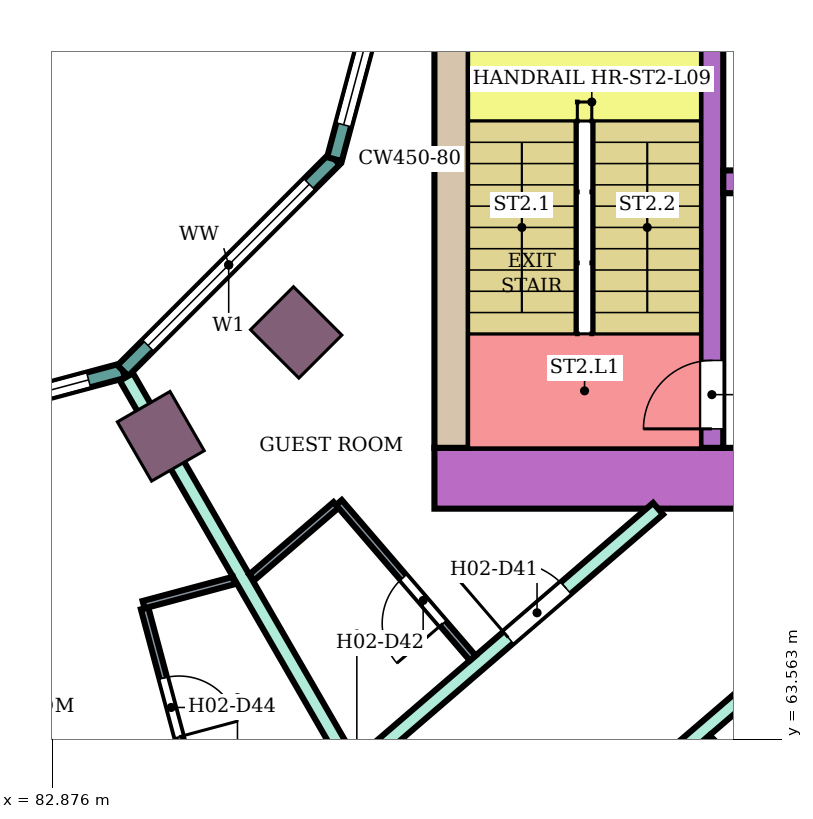
"""IFC4 building model, lengths in metres.
Left out: names, types, materials, properties, quantities, classifications, styles, units other than length and angle.
Written with IfcOpenShell. Run it as: python <this file> out.ifc"""

import sys

from ifc_helpers import new_model, si_unit, direction, frame, frame_2d, origin, origin_2d, place, context, subcontext, project, spatial, rectangle, extrude, element, fill, save


model = new_model("IFC4")
c1 = context("Model", 3, precision=1e-05, world=origin(), true_north=direction((0.0, 1.0)))
c2 = subcontext(c1, "Body", "Model", "MODEL_VIEW")
j1 = project(units=[si_unit("LENGTHUNIT", "METRE"), si_unit("PLANEANGLEUNIT", "RADIAN")], contexts=[c1])
p1 = place(None, origin())
s1 = spatial("IfcSite", under=j1, at=p1, CompositionType="ELEMENT")
p2 = place(p1, origin())
s2 = spatial("IfcBuilding", under=s1, at=p2, CompositionType="ELEMENT")
p3 = place(p2, frame((0.0, 0.0, 44.0)))
s3 = spatial("IfcBuildingStorey", under=s2, at=p3, CompositionType="ELEMENT", Elevation=44.0)
for number, where, z_axis, x_axis in (
    (1, (84.3, 67.552, 0.0), (0.0, 0.0, 1.0), (0.5, -0.866, 0.0)),
    (2, (86.081, 68.919, 0.0), (0.0, 0.0, 1.0), (0.707, -0.707, 0.0)),
):
    element("IfcColumn", number, at=place(p3, frame(where, z_axis=z_axis, x_axis=x_axis)), inside=s3, PredefinedType="COLUMN", context=c2, shape_type="SweptSolid", body=[
        extrude(rectangle(XDim=0.9, YDim=0.8, at=origin_2d()), origin(), (0.0, 0.0, 1.0), 3.8),
    ])
p4 = place(p3, frame((87.9, 67.0, 0.0), z_axis=(0.0, 0.0, 1.0), x_axis=(1.0, 0.0, 0.0)))
e3 = element("IfcWall", 3, at=p4, inside=s3, PredefinedType="SHEAR", context=c2, shape_type="SweptSolid", body=[
    extrude(rectangle(XDim=14.7, YDim=0.8, at=frame_2d((7.35, 0.0))), origin(), (0.0, 0.0, 1.0), 3.48),
])
p5 = place(p4, frame((4.2, 0.0, 0.0)))
e4 = element("IfcOpeningElement", 4, at=p5, cuts=e3, PredefinedType="OPENING", context=c2, shape_type="SweptSolid", body=[
    extrude(rectangle(XDim=2.4, YDim=2.4, at=frame_2d((1.2, 1.2))), frame((0.0, 0.41, 0.0), z_axis=(0.0, -1.0, 0.0), x_axis=(1.0, 0.0, 0.0)), (0.0, 0.0, 1.0), 0.82),
])
p6 = place(p3, frame((88.125, 67.4, 0.0), z_axis=(0.0, 0.0, 1.0), x_axis=(0.0, 1.0, 0.0)))
e5 = element("IfcWall", 5, at=p6, inside=s3, PredefinedType="SHEAR", context=c2, shape_type="SweptSolid", body=[
    extrude(rectangle(XDim=7.6, YDim=0.45, at=frame_2d((3.8, 0.0))), origin(), (0.0, 0.0, 1.0), 3.48),
])
p7 = place(p3, frame((91.55, 67.4, 0.0), z_axis=(0.0, 0.0, 1.0), x_axis=(0.0, 1.0, 0.0)))
e6 = element("IfcWall", 6, at=p7, inside=s3, PredefinedType="SHEAR", context=c2, shape_type="SweptSolid", body=[
    extrude(rectangle(XDim=7.6, YDim=0.3, at=frame_2d((3.8, 0.0))), origin(), (0.0, 0.0, 1.0), 3.48),
])
p8 = place(p7, frame((0.25, 0.0, 0.0)))
e7 = element("IfcOpeningElement", 7, at=p8, cuts=e6, PredefinedType="OPENING", context=c2, shape_type="SweptSolid", body=[
    extrude(rectangle(XDim=0.9, YDim=2.1, at=frame_2d((0.45, 1.05))), frame((0.0, 0.16, 0.0), z_axis=(0.0, -1.0, 0.0), x_axis=(1.0, 0.0, 0.0)), (0.0, 0.0, 1.0), 0.32),
])
p9 = place(p3, frame((91.7, 70.9, 0.0), z_axis=(0.0, 0.0, 1.0), x_axis=(1.0, 0.0, 0.0)))
e8 = element("IfcWall", 8, at=p9, inside=s3, PredefinedType="SHEAR", context=c2, shape_type="SweptSolid", body=[
    extrude(rectangle(XDim=10.9, YDim=0.3, at=frame_2d((5.45, 0.0))), origin(), (0.0, 0.0, 1.0), 3.48),
])
p10 = place(p9, frame((0.4, 0.0, 0.0)))
e9 = element("IfcOpeningElement", 9, at=p10, cuts=e8, PredefinedType="OPENING", context=c2, shape_type="SweptSolid", body=[
    extrude(rectangle(XDim=1.4, YDim=2.1, at=frame_2d((0.7, 1.05))), frame((0.0, 0.16, 0.0), z_axis=(0.0, -1.0, 0.0), x_axis=(1.0, 0.0, 0.0)), (0.0, 0.0, 1.0), 0.32),
])
p11 = place(p9, frame((5.4, 0.0, 0.0)))
e10 = element("IfcOpeningElement", 10, at=p11, cuts=e8, PredefinedType="OPENING", context=c2, shape_type="SweptSolid", body=[
    extrude(rectangle(XDim=1.4, YDim=2.1, at=frame_2d((0.7, 1.05))), frame((0.0, 0.16, 0.0), z_axis=(0.0, -1.0, 0.0), x_axis=(1.0, 0.0, 0.0)), (0.0, 0.0, 1.0), 0.32),
])
p12 = place(p9, frame((8.1, 0.0, 0.0)))
e11 = element("IfcOpeningElement", 11, at=p12, cuts=e8, PredefinedType="OPENING", context=c2, shape_type="SweptSolid", body=[
    extrude(rectangle(XDim=1.0, YDim=2.1, at=frame_2d((0.5, 1.05))), frame((0.0, 0.16, 0.0), z_axis=(0.0, -1.0, 0.0), x_axis=(1.0, 0.0, 0.0)), (0.0, 0.0, 1.0), 0.32),
])
p13 = place(p3, frame((80.0, 67.396, 0.0), z_axis=(0.0, 0.0, 1.0), x_axis=(0.965933654434, 0.258789828301, 0.0)))
e12 = element("IfcWall", 12, at=p13, inside=s3, PredefinedType="NOTDEFINED", context=c2, shape_type="SweptSolid", body=[
    extrude(rectangle(XDim=3.936, YDim=0.2, at=frame_2d((1.968, 0.0))), origin(), (0.0, 0.0, 1.0), 3.8),
])
p14 = place(p13, frame((0.468, 0.0, 0.9)))
e13 = element("IfcOpeningElement", 13, at=p14, cuts=e12, PredefinedType="OPENING", context=c2, shape_type="SweptSolid", body=[
    extrude(rectangle(XDim=3.0, YDim=2.3, at=frame_2d((1.5, 1.15))), frame((0.0, 0.11, 0.0), z_axis=(0.0, -1.0, 0.0), x_axis=(1.0, 0.0, 0.0)), (0.0, 0.0, 1.0), 0.22),
])
p15 = place(p3, frame((83.802, 68.415, 0.0), z_axis=(0.0, 0.0, 1.0), x_axis=(0.707106781187, 0.707106781187, 0.0)))
e14 = element("IfcWall", 14, at=p15, inside=s3, PredefinedType="NOTDEFINED", context=c2, shape_type="SweptSolid", body=[
    extrude(rectangle(XDim=3.936, YDim=0.2, at=frame_2d((1.968, 0.0))), origin(), (0.0, 0.0, 1.0), 3.8),
])
p16 = place(p15, frame((0.468, 0.0, 0.9)))
e15 = element("IfcOpeningElement", 15, at=p16, cuts=e14, PredefinedType="OPENING", context=c2, shape_type="SweptSolid", body=[
    extrude(rectangle(XDim=3.0, YDim=2.3, at=frame_2d((1.5, 1.15))), frame((0.0, 0.11, 0.0), z_axis=(0.0, -1.0, 0.0), x_axis=(1.0, 0.0, 0.0)), (0.0, 0.0, 1.0), 0.22),
])
p17 = place(p3, frame((86.585, 71.198, 0.0), z_axis=(0.0, 0.0, 1.0), x_axis=(0.258789828301, 0.965933654434, 0.0)))
e16 = element("IfcWall", 16, at=p17, inside=s3, PredefinedType="NOTDEFINED", context=c2, shape_type="SweptSolid", body=[
    extrude(rectangle(XDim=3.936, YDim=0.2, at=frame_2d((1.968, 0.0))), origin(), (0.0, 0.0, 1.0), 3.8),
])
p18 = place(p17, frame((0.468, 0.0, 0.9)))
e17 = element("IfcOpeningElement", 17, at=p18, cuts=e16, PredefinedType="OPENING", context=c2, shape_type="SweptSolid", body=[
    extrude(rectangle(XDim=3.0, YDim=2.3, at=frame_2d((1.5, 1.15))), frame((0.0, 0.11, 0.0), z_axis=(0.0, -1.0, 0.0), x_axis=(1.0, 0.0, 0.0)), (0.0, 0.0, 1.0), 0.22),
])
p19 = place(p3, frame((83.848, 68.332, 0.0), z_axis=(0.0, 0.0, 1.0), x_axis=(0.499919778085, -0.866071714975, 0.0)))
e18 = element("IfcWall", 18, at=p19, inside=s3, PredefinedType="PARTITIONING", context=c2, shape_type="SweptSolid", body=[
    extrude(rectangle(XDim=5.855, YDim=0.2, at=frame_2d((2.927, 0.0))), origin(), (0.0, 0.0, 1.0), 3.35),
])
p20 = place(p3, frame((86.877, 63.189, 0.0), z_axis=(0.0, 0.0, 1.0), x_axis=(0.758164888471, 0.652062881853, 0.0)))
e19 = element("IfcWall", 19, at=p20, inside=s3, PredefinedType="PARTITIONING", context=c2, shape_type="SweptSolid", body=[
    extrude(rectangle(XDim=5.23, YDim=0.2, at=frame_2d((2.615, 0.0))), origin(), (0.0, 0.0, 1.0), 3.35),
])
p21 = place(p20, frame((2.63, 0.0, 0.0)))
e20 = element("IfcOpeningElement", 20, at=p21, cuts=e19, PredefinedType="OPENING", context=c2, shape_type="SweptSolid", body=[
    extrude(rectangle(XDim=1.0, YDim=2.1, at=frame_2d((0.5, 1.05))), frame((0.0, 0.11, 0.0), z_axis=(0.0, -1.0, 0.0), x_axis=(1.0, 0.0, 0.0)), (0.0, 0.0, 1.0), 0.22),
])
p22 = place(p3, frame((88.235, 60.931, 0.0), z_axis=(0.0, 0.0, 1.0), x_axis=(0.758799498714, 0.651324282329, 0.0)))
e21 = element("IfcWall", 21, at=p22, inside=s3, PredefinedType="PARTITIONING", context=c2, shape_type="SweptSolid", body=[
    extrude(rectangle(XDim=6.186, YDim=0.2, at=frame_2d((3.093, 0.0))), origin(), (0.0, 0.0, 1.0), 3.35),
])
p23 = place(p22, frame((1.519, 0.0, 0.0)))
e22 = element("IfcOpeningElement", 22, at=p23, cuts=e21, PredefinedType="OPENING", context=c2, shape_type="SweptSolid", body=[
    extrude(rectangle(XDim=1.0, YDim=2.1, at=frame_2d((0.5, 1.05))), frame((0.0, 0.11, 0.0), z_axis=(0.0, -1.0, 0.0), x_axis=(1.0, 0.0, 0.0)), (0.0, 0.0, 1.0), 0.22),
])
p24 = place(p3, frame((91.449, 63.548, 0.0), z_axis=(0.0, 0.0, 1.0), x_axis=(0.706984810649, -0.707228730688, 0.0)))
e23 = element("IfcWall", 23, at=p24, inside=s3, PredefinedType="PARTITIONING", context=c2, shape_type="SweptSolid", body=[
    extrude(rectangle(XDim=7.006, YDim=0.2, at=frame_2d((3.503, 0.0))), origin(), (0.0, 0.0, 1.0), 3.35),
])
p25 = place(p3, frame((84.087, 65.289, 0.0), z_axis=(0.0, 0.0, 1.0), x_axis=(0.258929459649, -0.965896234037, 0.0)))
e24 = element("IfcWall", 24, at=p25, inside=s3, PredefinedType="PARTITIONING", context=c2, shape_type="SweptSolid", body=[
    extrude(rectangle(XDim=2.65, YDim=0.1, at=frame_2d((1.325, 0.0))), origin(), (0.0, 0.0, 1.0), 3.35),
])
p26 = place(p25, frame((0.95, 0.0, 0.0)))
e25 = element("IfcOpeningElement", 25, at=p26, cuts=e24, PredefinedType="OPENING", context=c2, shape_type="SweptSolid", body=[
    extrude(rectangle(XDim=0.8, YDim=2.1, at=frame_2d((0.4, 1.05))), frame((0.0, 0.06, 0.0), z_axis=(0.0, -1.0, 0.0), x_axis=(1.0, 0.0, 0.0)), (0.0, 0.0, 1.0), 0.12),
])
p27 = place(p3, frame((84.074, 65.337, 0.0), z_axis=(0.0, 0.0, 1.0), x_axis=(0.965914351064, 0.258861867428, 0.0)))
e26 = element("IfcWall", 26, at=p27, inside=s3, PredefinedType="PARTITIONING", context=c2, shape_type="SweptSolid", body=[
    extrude(rectangle(XDim=1.229, YDim=0.1, at=frame_2d((0.615, 0.0))), origin(), (0.0, 0.0, 1.0), 3.35),
])
p28 = place(p3, frame((85.497, 65.696, 0.0), z_axis=(0.0, 0.0, 1.0), x_axis=(0.75817032582, 0.652056559698, 0.0)))
e27 = element("IfcWall", 27, at=p28, inside=s3, PredefinedType="PARTITIONING", context=c2, shape_type="SweptSolid", body=[
    extrude(rectangle(XDim=1.461, YDim=0.1, at=frame_2d((0.73, 0.0))), origin(), (0.0, 0.0, 1.0), 3.35),
])
p29 = place(p3, frame((86.643, 66.681, 0.0), z_axis=(0.0, 0.0, 1.0), x_axis=(0.652264876065, -0.757991115682, 0.0)))
e28 = element("IfcWall", 28, at=p29, inside=s3, PredefinedType="PARTITIONING", context=c2, shape_type="SweptSolid", body=[
    extrude(rectangle(XDim=2.699, YDim=0.1, at=frame_2d((1.35, 0.0))), origin(), (0.0, 0.0, 1.0), 3.35),
])
p30 = place(p29, frame((1.3, 0.0, 0.0)))
e29 = element("IfcOpeningElement", 29, at=p30, cuts=e28, PredefinedType="OPENING", context=c2, shape_type="SweptSolid", body=[
    extrude(rectangle(XDim=0.8, YDim=2.1, at=frame_2d((0.4, 1.05))), frame((0.0, 0.06, 0.0), z_axis=(0.0, -1.0, 0.0), x_axis=(1.0, 0.0, 0.0)), (0.0, 0.0, 1.0), 0.12),
])
p31 = place(p14, origin())
e30 = element("IfcWindow", 30, at=p31, inside=s3, PartitioningType="SINGLE_PANEL", PredefinedType="WINDOW", context=c2, shape_type="SweptSolid", body=[
    extrude(rectangle(XDim=3.0, YDim=2.3, at=frame_2d((1.5, 1.15))), frame((0.0, 0.03, 0.0), z_axis=(0.0, -1.0, 0.0), x_axis=(1.0, 0.0, 0.0)), (0.0, 0.0, 1.0), 0.06),
])
fill(e13, e30)
p32 = place(p16, origin())
e31 = element("IfcWindow", 31, at=p32, inside=s3, PartitioningType="SINGLE_PANEL", PredefinedType="WINDOW", context=c2, shape_type="SweptSolid", body=[
    extrude(rectangle(XDim=3.0, YDim=2.3, at=frame_2d((1.5, 1.15))), frame((0.0, 0.03, 0.0), z_axis=(0.0, -1.0, 0.0), x_axis=(1.0, 0.0, 0.0)), (0.0, 0.0, 1.0), 0.06),
])
fill(e15, e31)
p33 = place(p18, origin())
e32 = element("IfcWindow", 32, at=p33, inside=s3, PartitioningType="SINGLE_PANEL", PredefinedType="WINDOW", context=c2, shape_type="SweptSolid", body=[
    extrude(rectangle(XDim=3.0, YDim=2.3, at=frame_2d((1.5, 1.15))), frame((0.0, 0.03, 0.0), z_axis=(0.0, -1.0, 0.0), x_axis=(1.0, 0.0, 0.0)), (0.0, 0.0, 1.0), 0.06),
])
fill(e17, e32)
p34 = place(p21, origin())
e33 = element("IfcDoor", 33, at=p34, inside=s3, OperationType="SINGLE_SWING_LEFT", PredefinedType="DOOR", context=c2, shape_type="SweptSolid", body=[
    extrude(rectangle(XDim=1.0, YDim=2.1, at=frame_2d((0.5, 1.05))), frame((0.0, 0.025, 0.0), z_axis=(0.0, -1.0, 0.0), x_axis=(1.0, 0.0, 0.0)), (0.0, 0.0, 1.0), 0.05),
])
fill(e20, e33)
p35 = place(p30, frame((0.8, 0.0, 0.0), z_axis=(0.0, 0.0, 1.0), x_axis=(-1.0, 0.0, 0.0)))
e34 = element("IfcDoor", 34, at=p35, inside=s3, OperationType="SINGLE_SWING_LEFT", PredefinedType="DOOR", context=c2, shape_type="SweptSolid", body=[
    extrude(rectangle(XDim=0.8, YDim=2.1, at=frame_2d((0.4, 1.05))), frame((0.0, 0.025, 0.0), z_axis=(0.0, -1.0, 0.0), x_axis=(1.0, 0.0, 0.0)), (0.0, 0.0, 1.0), 0.05),
])
fill(e29, e34)
p36 = place(p26, origin())
e35 = element("IfcDoor", 35, at=p36, inside=s3, OperationType="SINGLE_SWING_RIGHT", PredefinedType="DOOR", context=c2, shape_type="SweptSolid", body=[
    extrude(rectangle(XDim=0.8, YDim=2.1, at=frame_2d((0.4, 1.05))), frame((0.0, 0.025, 0.0), z_axis=(0.0, -1.0, 0.0), x_axis=(1.0, 0.0, 0.0)), (0.0, 0.0, 1.0), 0.05),
])
fill(e25, e35)
p37 = place(p8, origin())
e36 = element("IfcDoor", 36, at=p37, inside=s3, OperationType="SINGLE_SWING_LEFT", PredefinedType="DOOR", context=c2, shape_type="SweptSolid", body=[
    extrude(rectangle(XDim=0.9, YDim=2.1, at=frame_2d((0.45, 1.05))), frame((0.0, 0.025, 0.0), z_axis=(0.0, -1.0, 0.0), x_axis=(1.0, 0.0, 0.0)), (0.0, 0.0, 1.0), 0.05),
])
fill(e7, e36)
save(model, sys.argv[1])
